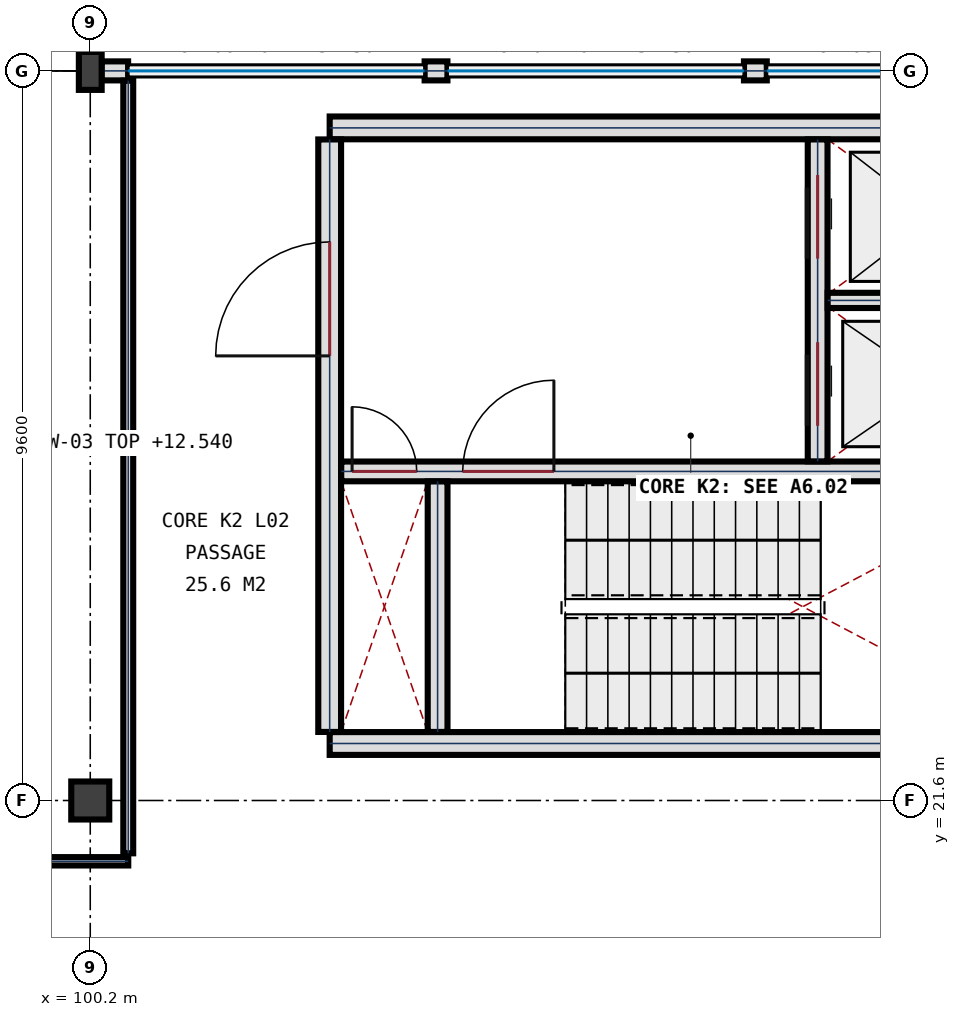
"""IFC4 building model, lengths in metres.
Left out: names, types, materials, properties, quantities, classifications, styles, units other than length and angle.
Written with IfcOpenShell. Run it as: python <this file> out.ifc"""

import sys

from ifc_helpers import new_model, si_unit, direction, frame, frame_2d, origin, origin_2d, place, context, subcontext, project, spatial, rectangle, i_section, extrude, element, fill, save


model = new_model("IFC4")
c1 = context("Model", 3, precision=1e-05, world=origin(), true_north=direction((0.0, 1.0)))
c2 = subcontext(c1, "Body", "Model", "MODEL_VIEW")
j1 = project(units=[si_unit("LENGTHUNIT", "METRE"), si_unit("PLANEANGLEUNIT", "RADIAN")], contexts=[c1])
p1 = place(None, origin())
s1 = spatial("IfcSite", under=j1, at=p1, CompositionType="ELEMENT")
p2 = place(p1, origin())
s2 = spatial("IfcBuilding", under=s1, at=p2, CompositionType="ELEMENT")
p3 = place(p2, frame((0.0, 0.0, 9.9)))
s3 = spatial("IfcBuildingStorey", under=s2, at=p3, CompositionType="ELEMENT", Elevation=9.9)
p4 = place(p3, frame((100.2, 21.6, 0.0), z_axis=(0.0, 0.0, 1.0), x_axis=(1.0, 0.0, 0.0)))
e1 = element("IfcColumn", 1, at=p4, inside=s3, PredefinedType="COLUMN", context=c2, shape_type="SweptSolid", body=[
    extrude(rectangle(XDim=0.5, YDim=0.5, at=origin_2d()), origin(), (0.0, 0.0, 1.0), 4.5),
])
p5 = place(p3, frame((100.2, 31.2, 0.0), z_axis=(0.0, 0.0, 1.0), x_axis=(1.0, 0.0, 0.0)))
e2 = element("IfcColumn", 2, at=p5, inside=s3, PredefinedType="COLUMN", context=c2, shape_type="SweptSolid", body=[
    extrude(i_section(OverallWidth=0.3, OverallDepth=0.5, WebThickness=0.014, FlangeThickness=0.028, FilletRadius=0.027, at=origin_2d()), origin(), (0.0, 0.0, 1.0), 4.5),
])
for number, where, z_axis, x_axis in (
    (3, (100.2, 31.798, 0.0), (0.0, 0.0, 1.0), (0.0, -1.0, 0.0)),
    (4, (100.348, 31.2, 0.0), (0.0, 0.0, 1.0), (1.0, 0.0, 0.0)),
):
    element("IfcWall", number, at=place(p3, frame(where, z_axis=z_axis, x_axis=x_axis)), inside=s3, PredefinedType="SOLIDWALL", context=c2, shape_type="SweptSolid", body=[
        extrude(rectangle(XDim=0.35, YDim=0.25, at=frame_2d((0.175, 0.0))), origin(), (0.0, 0.0, 1.0), 3.25),
    ])
p6 = place(p3, frame((104.599, 31.2, 0.0), z_axis=(0.0, 0.0, 1.0), x_axis=(1.0, 0.0, 0.0)))
e5 = element("IfcWall", 5, at=p6, inside=s3, PredefinedType="SOLIDWALL", context=c2, shape_type="SweptSolid", body=[
    extrude(rectangle(XDim=0.3, YDim=0.25, at=frame_2d((0.15, 0.0))), origin(), (0.0, 0.0, 1.0), 3.25),
])
p7 = place(p3, frame((108.801, 31.2, 0.0), z_axis=(0.0, 0.0, 1.0), x_axis=(1.0, 0.0, 0.0)))
e6 = element("IfcWall", 6, at=p7, inside=s3, PredefinedType="SOLIDWALL", context=c2, shape_type="SweptSolid", body=[
    extrude(rectangle(XDim=0.3, YDim=0.25, at=frame_2d((0.15, 0.0))), origin(), (0.0, 0.0, 1.0), 3.25),
])
for number, where, z_axis, x_axis in (
    (7, (112.85, 22.35, 0.0), (0.0, 0.0, 1.0), (-1.0, 0.0, 0.0)),
    (8, (103.35, 30.45, 0.0), (0.0, 0.0, 1.0), (1.0, 0.0, 0.0)),
):
    element("IfcWall", number, at=place(p3, frame(where, z_axis=z_axis, x_axis=x_axis)), inside=s3, PredefinedType="SHEAR", context=c2, shape_type="SweptSolid", body=[
        extrude(rectangle(XDim=9.5, YDim=0.3, at=frame_2d((4.75, 0.0))), origin(), (0.0, 0.0, 1.0), 4.5),
    ])
p8 = place(p3, frame((103.35, 22.502, 0.0), z_axis=(0.0, 0.0, 1.0), x_axis=(0.0, 1.0, 0.0)))
e9 = element("IfcWall", 9, at=p8, inside=s3, PredefinedType="SHEAR", context=c2, shape_type="SweptSolid", body=[
    extrude(rectangle(XDim=7.796, YDim=0.3, at=frame_2d((3.898, 0.0))), origin(), (0.0, 0.0, 1.0), 4.5),
])
p9 = place(p8, frame((4.948, 0.0, 0.0)))
e10 = element("IfcOpeningElement", 10, at=p9, cuts=e9, PredefinedType="OPENING", context=c2, shape_type="SweptSolid", body=[
    extrude(rectangle(XDim=1.5, YDim=2.25, at=frame_2d((0.75, 1.125))), frame((0.0, 0.16, 0.0), z_axis=(0.0, -1.0, 0.0), x_axis=(1.0, 0.0, 0.0)), (0.0, 0.0, 1.0), 0.32),
])
p10 = place(p3, frame((103.502, 25.93, 0.0), z_axis=(0.0, 0.0, 1.0), x_axis=(1.0, 0.0, 0.0)))
e11 = element("IfcWall", 11, at=p10, inside=s3, PredefinedType="SHEAR", context=c2, shape_type="SweptSolid", body=[
    extrude(rectangle(XDim=9.196, YDim=0.26, at=frame_2d((4.598, 0.0))), origin(), (0.0, 0.0, 1.0), 4.5),
])
p11 = place(p10, frame((1.598, 0.0, 0.0)))
e12 = element("IfcOpeningElement", 12, at=p11, cuts=e11, PredefinedType="OPENING", context=c2, shape_type="SweptSolid", body=[
    extrude(rectangle(XDim=1.2, YDim=2.2, at=frame_2d((0.6, 1.1))), frame((0.0, 0.14, 0.0), z_axis=(0.0, -1.0, 0.0), x_axis=(1.0, 0.0, 0.0)), (0.0, 0.0, 1.0), 0.28),
])
p12 = place(p10, frame((0.143, 0.0, 0.0)))
e13 = element("IfcOpeningElement", 13, at=p12, cuts=e11, PredefinedType="OPENING", context=c2, shape_type="SweptSolid", body=[
    extrude(rectangle(XDim=0.85, YDim=2.05, at=frame_2d((0.425, 1.025))), frame((0.0, 0.14, 0.0), z_axis=(0.0, -1.0, 0.0), x_axis=(1.0, 0.0, 0.0)), (0.0, 0.0, 1.0), 0.28),
])
p13 = place(p3, frame((104.77, 22.502, 0.0), z_axis=(0.0, 0.0, 1.0), x_axis=(0.0, 1.0, 0.0)))
e14 = element("IfcWall", 14, at=p13, inside=s3, PredefinedType="SHEAR", context=c2, shape_type="SweptSolid", body=[
    extrude(rectangle(XDim=3.296, YDim=0.26, at=frame_2d((1.648, 0.0))), origin(), (0.0, 0.0, 1.0), 4.5),
])
p14 = place(p3, frame((109.77, 26.062, 0.0), z_axis=(0.0, 0.0, 1.0), x_axis=(0.0, 1.0, 0.0)))
e15 = element("IfcWall", 15, at=p14, inside=s3, PredefinedType="SHEAR", context=c2, shape_type="SweptSolid", body=[
    extrude(rectangle(XDim=4.236, YDim=0.26, at=frame_2d((2.118, 0.0))), origin(), (0.0, 0.0, 1.0), 4.5),
])
p15 = place(p14, frame((0.468, 0.0, 0.0)))
e16 = element("IfcOpeningElement", 16, at=p15, cuts=e15, PredefinedType="OPENING", context=c2, shape_type="SweptSolid", body=[
    extrude(rectangle(XDim=1.1, YDim=2.15, at=frame_2d((0.55, 1.075))), frame((0.0, 0.14, 0.0), z_axis=(0.0, -1.0, 0.0), x_axis=(1.0, 0.0, 0.0)), (0.0, 0.0, 1.0), 0.28),
])
p16 = place(p14, frame((2.668, 0.0, 0.0)))
e17 = element("IfcOpeningElement", 17, at=p16, cuts=e15, PredefinedType="OPENING", context=c2, shape_type="SweptSolid", body=[
    extrude(rectangle(XDim=1.1, YDim=2.15, at=frame_2d((0.55, 1.075))), frame((0.0, 0.14, 0.0), z_axis=(0.0, -1.0, 0.0), x_axis=(1.0, 0.0, 0.0)), (0.0, 0.0, 1.0), 0.28),
])
p17 = place(p3, frame((109.902, 28.18, 0.0), z_axis=(0.0, 0.0, 1.0), x_axis=(1.0, 0.0, 0.0)))
e18 = element("IfcWall", 18, at=p17, inside=s3, PredefinedType="PLUMBINGWALL", context=c2, shape_type="SweptSolid", body=[
    extrude(rectangle(XDim=2.796, YDim=0.2, at=frame_2d((1.398, 0.0))), origin(), (0.0, 0.0, 1.0), 4.16),
])
p18 = place(p3, frame((59.2, 20.8, 0.0), z_axis=(0.0, 0.0, 1.0), x_axis=(1.0, 0.0, 0.0)))
e19 = element("IfcWall", 19, at=p18, inside=s3, PredefinedType="PARTITIONING", context=c2, shape_type="SweptSolid", body=[
    extrude(rectangle(XDim=41.5, YDim=0.11, at=frame_2d((20.75, 0.0))), origin(), (0.0, 0.0, 1.0), 3.5),
])
p19 = place(p18, frame((19.875, 0.0, 0.0)))
e20 = element("IfcOpeningElement", 20, at=p19, cuts=e19, PredefinedType="OPENING", context=c2, shape_type="SweptSolid", body=[
    extrude(rectangle(XDim=1.85, YDim=2.35, at=frame_2d((0.925, 1.175))), frame((0.0, 0.065, 0.0), z_axis=(0.0, -1.0, 0.0), x_axis=(1.0, 0.0, 0.0)), (0.0, 0.0, 1.0), 0.13),
])
p20 = place(p3, frame((100.7, 20.905, 0.0), z_axis=(0.0, 0.0, 1.0), x_axis=(0.0, 1.0, 0.0)))
e21 = element("IfcWall", 21, at=p20, inside=s3, PredefinedType="PARTITIONING", context=c2, shape_type="SweptSolid", body=[
    extrude(rectangle(XDim=10.166, YDim=0.13, at=frame_2d((5.083, 0.0))), origin(), (0.0, 0.0, 1.0), 2.64),
])
p21 = place(p9, origin())
e22 = element("IfcDoor", 22, at=p21, inside=s3, OperationType="SINGLE_SWING_LEFT", PredefinedType="DOOR", context=c2, shape_type="SweptSolid", body=[
    extrude(rectangle(XDim=1.5, YDim=2.25, at=frame_2d((0.75, 1.125))), frame((0.0, 0.032, 0.0), z_axis=(0.0, -1.0, 0.0), x_axis=(1.0, 0.0, 0.0)), (0.0, 0.0, 1.0), 0.065),
])
fill(e10, e22)
p22 = place(p11, origin())
e23 = element("IfcDoor", 23, at=p22, inside=s3, OperationType="SINGLE_SWING_RIGHT", PredefinedType="DOOR", context=c2, shape_type="SweptSolid", body=[
    extrude(rectangle(XDim=1.2, YDim=2.2, at=frame_2d((0.6, 1.1))), frame((0.0, 0.032, 0.0), z_axis=(0.0, -1.0, 0.0), x_axis=(1.0, 0.0, 0.0)), (0.0, 0.0, 1.0), 0.065),
])
fill(e12, e23)
p23 = place(p12, origin())
e24 = element("IfcDoor", 24, at=p23, inside=s3, OperationType="SINGLE_SWING_LEFT", PredefinedType="DOOR", context=c2, shape_type="SweptSolid", body=[
    extrude(rectangle(XDim=0.85, YDim=2.05, at=frame_2d((0.425, 1.025))), frame((0.0, 0.032, 0.0), z_axis=(0.0, -1.0, 0.0), x_axis=(1.0, 0.0, 0.0)), (0.0, 0.0, 1.0), 0.065),
])
fill(e13, e24)
p24 = place(p15, origin())
e25 = element("IfcDoor", 25, at=p24, inside=s3, OperationType="SLIDING_TO_LEFT", PredefinedType="DOOR", context=c2, shape_type="SweptSolid", body=[
    extrude(rectangle(XDim=1.1, YDim=2.15, at=frame_2d((0.55, 1.075))), frame((0.0, 0.032, 0.0), z_axis=(0.0, -1.0, 0.0), x_axis=(1.0, 0.0, 0.0)), (0.0, 0.0, 1.0), 0.065),
])
fill(e16, e25)
p25 = place(p16, origin())
e26 = element("IfcDoor", 26, at=p25, inside=s3, OperationType="SLIDING_TO_LEFT", PredefinedType="DOOR", context=c2, shape_type="SweptSolid", body=[
    extrude(rectangle(XDim=1.1, YDim=2.15, at=frame_2d((0.55, 1.075))), frame((0.0, 0.032, 0.0), z_axis=(0.0, -1.0, 0.0), x_axis=(1.0, 0.0, 0.0)), (0.0, 0.0, 1.0), 0.065),
])
fill(e17, e26)
save(model, sys.argv[1])
